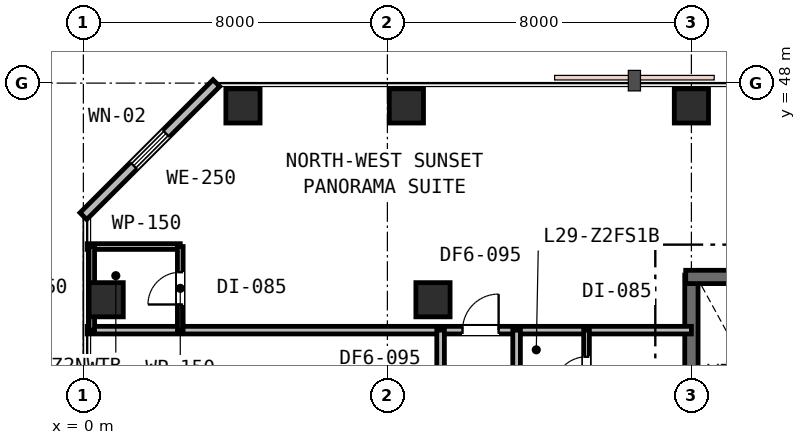
"""IFC4 building model, lengths in metres.
Left out: names, types, materials, properties, quantities, classifications, styles, units other than length and angle.
Written with IfcOpenShell. Run it as: python <this file> out.ifc"""

import sys

from ifc_helpers import new_model, si_unit, direction, frame, frame_2d, origin, origin_2d, place, context, subcontext, project, spatial, rectangle, extrude, element, fill, save


model = new_model("IFC4")
c1 = context("Model", 3, precision=1e-05, world=origin(), true_north=direction((0.0, 1.0)))
c2 = subcontext(c1, "Body", "Model", "MODEL_VIEW")
j1 = project(units=[si_unit("LENGTHUNIT", "METRE"), si_unit("PLANEANGLEUNIT", "RADIAN")], contexts=[c1])
p1 = place(None, origin())
s1 = spatial("IfcSite", under=j1, at=p1, CompositionType="ELEMENT")
p2 = place(p1, origin())
s2 = spatial("IfcBuilding", under=s1, at=p2, CompositionType="ELEMENT")
p3 = place(p2, frame((0.0, 0.0, 115.2)))
s3 = spatial("IfcBuildingStorey", under=s2, at=p3, CompositionType="ELEMENT", Elevation=115.2)
p4 = place(p3, frame((16.0, 30.65, 0.0), z_axis=(0.0, 0.0, 1.0), x_axis=(0.0, 1.0, 0.0)))
e1 = element("IfcWall", 1, at=p4, inside=s3, PredefinedType="SHEAR", context=c2, shape_type="SweptSolid", body=[
    extrude(rectangle(XDim=12.3, YDim=0.35, at=frame_2d((6.15, 0.0))), origin(), (0.0, 0.0, 1.0), 3.6),
])
p5 = place(p3, frame((15.85, 42.9, 0.0), z_axis=(0.0, 0.0, 1.0), x_axis=(1.0, 0.0, 0.0)))
e2 = element("IfcWall", 2, at=p5, inside=s3, PredefinedType="SHEAR", context=c2, shape_type="SweptSolid", body=[
    extrude(rectangle(XDim=24.3, YDim=0.35, at=frame_2d((12.15, 0.0))), origin(), (0.0, 0.0, 1.0), 3.6),
])
for number, where, z_axis, x_axis in (
    (3, (9.2, 42.3, 0.0), (0.0, 0.0, 1.0), (1.0, 0.0, 0.0)),
    (4, (0.6, 42.3, 0.0), (0.0, 0.0, 1.0), (1.0, 0.0, 0.0)),
    (5, (4.2, 47.4, 0.0), (0.0, 0.0, 1.0), (1.0, 0.0, 0.0)),
    (6, (8.5, 47.4, 0.0), (0.0, 0.0, 1.0), (1.0, 0.0, 0.0)),
    (7, (16.0, 47.4, 0.0), (0.0, 0.0, 1.0), (1.0, 0.0, 0.0)),
):
    element("IfcColumn", number, at=place(p3, frame(where, z_axis=z_axis, x_axis=x_axis)), inside=s3, PredefinedType="COLUMN", context=c2, shape_type="SweptSolid", body=[
        extrude(rectangle(XDim=0.9, YDim=0.9, at=origin_2d()), origin(), (0.0, 0.0, 1.0), 3.6),
    ])
p6 = place(p3, frame((3.5, 48.0, 0.0), z_axis=(0.0, 0.0, 1.0), x_axis=(-0.707106781187, -0.707106781187, 0.0)))
e8 = element("IfcWall", 8, at=p6, inside=s3, PredefinedType="STANDARD", context=c2, shape_type="SweptSolid", body=[
    extrude(rectangle(XDim=4.95, YDim=0.25, at=frame_2d((2.475, 0.0))), origin(), (0.0, 0.0, 1.0), 3.33),
])
p7 = place(p6, frame((1.875, 0.0, 0.85)))
e9 = element("IfcOpeningElement", 9, at=p7, cuts=e8, PredefinedType="OPENING", context=c2, shape_type="SweptSolid", body=[
    extrude(rectangle(XDim=1.2, YDim=1.6, at=frame_2d((0.6, 0.8))), frame((0.0, 0.135, 0.0), z_axis=(0.0, -1.0, 0.0), x_axis=(1.0, 0.0, 0.0)), (0.0, 0.0, 1.0), 0.27),
])
p8 = place(p3, frame((0.1, 41.5, 0.0), z_axis=(0.0, 0.0, 1.0), x_axis=(1.0, 0.0, 0.0)))
e10 = element("IfcWall", 10, at=p8, inside=s3, PredefinedType="PARTITIONING", context=c2, shape_type="SweptSolid", body=[
    extrude(rectangle(XDim=15.9, YDim=0.2, at=frame_2d((7.95, 0.0))), origin(), (0.0, 0.0, 1.0), 2.87),
])
p9 = place(p8, frame((9.877, 0.0, 0.0)))
e11 = element("IfcOpeningElement", 11, at=p9, cuts=e10, PredefinedType="OPENING", context=c2, shape_type="SweptSolid", body=[
    extrude(rectangle(XDim=0.95, YDim=2.15, at=frame_2d((0.475, 1.075))), frame((0.0, 0.11, 0.0), z_axis=(0.0, -1.0, 0.0), x_axis=(1.0, 0.0, 0.0)), (0.0, 0.0, 1.0), 0.22),
])
p10 = place(p3, frame((0.1, 43.7, 0.0), z_axis=(0.0, 0.0, 1.0), x_axis=(1.0, 0.0, 0.0)))
e12 = element("IfcWall", 12, at=p10, inside=s3, PredefinedType="PARTITIONING", context=c2, shape_type="SweptSolid", body=[
    extrude(rectangle(XDim=2.45, YDim=0.15, at=frame_2d((1.225, 0.0))), origin(), (0.0, 0.0, 1.0), 3.33),
])
p11 = place(p3, frame((2.55, 41.5, 0.0), z_axis=(0.0, 0.0, 1.0), x_axis=(0.0, 1.0, 0.0)))
e13 = element("IfcWall", 13, at=p11, inside=s3, PredefinedType="PARTITIONING", context=c2, shape_type="SweptSolid", body=[
    extrude(rectangle(XDim=2.2, YDim=0.15, at=frame_2d((1.1, 0.0))), origin(), (0.0, 0.0, 1.0), 2.87),
])
p12 = place(p11, frame((0.675, 0.0, 0.0)))
e14 = element("IfcOpeningElement", 14, at=p12, cuts=e13, PredefinedType="OPENING", context=c2, shape_type="SweptSolid", body=[
    extrude(rectangle(XDim=0.85, YDim=2.15, at=frame_2d((0.425, 1.075))), frame((0.0, 0.085, 0.0), z_axis=(0.0, -1.0, 0.0), x_axis=(1.0, 0.0, 0.0)), (0.0, 0.0, 1.0), 0.17),
])
p13 = place(p3, frame((0.22, 41.5, 0.0), z_axis=(0.0, 0.0, 1.0), x_axis=(0.0, 1.0, 0.0)))
e15 = element("IfcWall", 15, at=p13, inside=s3, PredefinedType="PARTITIONING", context=c2, shape_type="SweptSolid", body=[
    extrude(rectangle(XDim=2.2, YDim=0.15, at=frame_2d((1.1, 0.0))), origin(), (0.0, 0.0, 1.0), 2.87),
])
p14 = place(p3, frame((9.4, 28.6, 0.0), z_axis=(0.0, 0.0, 1.0), x_axis=(0.0, 1.0, 0.0)))
e16 = element("IfcWall", 16, at=p14, inside=s3, PredefinedType="PARTITIONING", context=c2, shape_type="SweptSolid", body=[
    extrude(rectangle(XDim=12.9, YDim=0.2, at=frame_2d((6.45, 0.0))), origin(), (0.0, 0.0, 1.0), 2.87),
])
p15 = place(p14, frame((3.005, 0.0, 0.0)))
e17 = element("IfcOpeningElement", 17, at=p15, cuts=e16, PredefinedType="OPENING", context=c2, shape_type="SweptSolid", body=[
    extrude(rectangle(XDim=0.95, YDim=2.15, at=frame_2d((0.475, 1.075))), frame((0.0, 0.11, 0.0), z_axis=(0.0, -1.0, 0.0), x_axis=(1.0, 0.0, 0.0)), (0.0, 0.0, 1.0), 0.22),
])
p16 = place(p14, frame((6.025, 0.0, 0.0)))
e18 = element("IfcOpeningElement", 18, at=p16, cuts=e16, PredefinedType="OPENING", context=c2, shape_type="SweptSolid", body=[
    extrude(rectangle(XDim=0.95, YDim=2.15, at=frame_2d((0.475, 1.075))), frame((0.0, 0.11, 0.0), z_axis=(0.0, -1.0, 0.0), x_axis=(1.0, 0.0, 0.0)), (0.0, 0.0, 1.0), 0.22),
])
p17 = place(p14, frame((10.275, 0.0, 0.0)))
e19 = element("IfcOpeningElement", 19, at=p17, cuts=e16, PredefinedType="OPENING", context=c2, shape_type="SweptSolid", body=[
    extrude(rectangle(XDim=0.95, YDim=2.15, at=frame_2d((0.475, 1.075))), frame((0.0, 0.11, 0.0), z_axis=(0.0, -1.0, 0.0), x_axis=(1.0, 0.0, 0.0)), (0.0, 0.0, 1.0), 0.22),
])
p18 = place(p3, frame((11.4, 30.8, 0.0), z_axis=(0.0, 0.0, 1.0), x_axis=(0.0, 1.0, 0.0)))
e20 = element("IfcWall", 20, at=p18, inside=s3, PredefinedType="PARTITIONING", context=c2, shape_type="SweptSolid", body=[
    extrude(rectangle(XDim=10.7, YDim=0.2, at=frame_2d((5.35, 0.0))), origin(), (0.0, 0.0, 1.0), 2.87),
])
p19 = place(p18, frame((3.405, 0.0, 0.0)))
e21 = element("IfcOpeningElement", 21, at=p19, cuts=e20, PredefinedType="OPENING", context=c2, shape_type="SweptSolid", body=[
    extrude(rectangle(XDim=0.95, YDim=2.15, at=frame_2d((0.475, 1.075))), frame((0.0, 0.11, 0.0), z_axis=(0.0, -1.0, 0.0), x_axis=(1.0, 0.0, 0.0)), (0.0, 0.0, 1.0), 0.22),
])
p20 = place(p3, frame((13.24, 39.25, 0.0), z_axis=(0.0, 0.0, 1.0), x_axis=(0.0, 1.0, 0.0)))
e22 = element("IfcWall", 22, at=p20, inside=s3, PredefinedType="PARTITIONING", context=c2, shape_type="SweptSolid", body=[
    extrude(rectangle(XDim=2.25, YDim=0.15, at=frame_2d((1.125, 0.0))), origin(), (0.0, 0.0, 1.0), 3.33),
])
p21 = place(p20, frame((0.7, 0.0, 0.0)))
e23 = element("IfcOpeningElement", 23, at=p21, cuts=e22, PredefinedType="OPENING", context=c2, shape_type="SweptSolid", body=[
    extrude(rectangle(XDim=0.85, YDim=2.15, at=frame_2d((0.425, 1.075))), frame((0.0, 0.085, 0.0), z_axis=(0.0, -1.0, 0.0), x_axis=(1.0, 0.0, 0.0)), (0.0, 0.0, 1.0), 0.17),
])
p22 = place(p7, origin())
e24 = element("IfcWindow", 24, at=p22, inside=s3, PartitioningType="SINGLE_PANEL", PredefinedType="WINDOW", context=c2, shape_type="SweptSolid", body=[
    extrude(rectangle(XDim=1.2, YDim=1.6, at=frame_2d((0.6, 0.8))), frame((0.0, 0.03, 0.0), z_axis=(0.0, -1.0, 0.0), x_axis=(1.0, 0.0, 0.0)), (0.0, 0.0, 1.0), 0.06),
])
fill(e9, e24)
p23 = place(p9, origin())
e25 = element("IfcDoor", 25, at=p23, inside=s3, OperationType="SINGLE_SWING_RIGHT", PredefinedType="DOOR", context=c2, shape_type="SweptSolid", body=[
    extrude(rectangle(XDim=0.95, YDim=2.15, at=frame_2d((0.475, 1.075))), frame((0.0, 0.025, 0.0), z_axis=(0.0, -1.0, 0.0), x_axis=(1.0, 0.0, 0.0)), (0.0, 0.0, 1.0), 0.05),
])
fill(e11, e25)
p24 = place(p12, origin())
e26 = element("IfcDoor", 26, at=p24, inside=s3, OperationType="SINGLE_SWING_LEFT", PredefinedType="DOOR", context=c2, shape_type="SweptSolid", body=[
    extrude(rectangle(XDim=0.85, YDim=2.15, at=frame_2d((0.425, 1.075))), frame((0.0, 0.025, 0.0), z_axis=(0.0, -1.0, 0.0), x_axis=(1.0, 0.0, 0.0)), (0.0, 0.0, 1.0), 0.05),
])
fill(e14, e26)
p25 = place(p21, origin())
e27 = element("IfcDoor", 27, at=p25, inside=s3, OperationType="SINGLE_SWING_LEFT", PredefinedType="DOOR", context=c2, shape_type="SweptSolid", body=[
    extrude(rectangle(XDim=0.85, YDim=2.15, at=frame_2d((0.425, 1.075))), frame((0.0, 0.025, 0.0), z_axis=(0.0, -1.0, 0.0), x_axis=(1.0, 0.0, 0.0)), (0.0, 0.0, 1.0), 0.05),
])
fill(e23, e27)
save(model, sys.argv[1])
